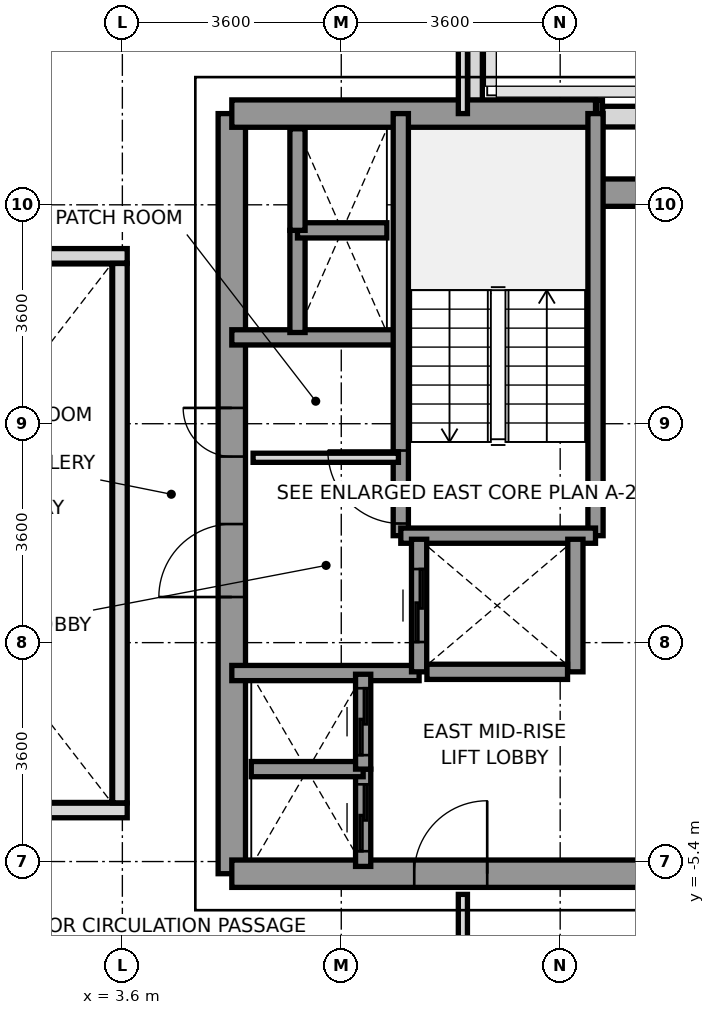
"""IFC4 building model, lengths in metres.
Left out: names, types, materials, properties, quantities, classifications, styles, units other than length and angle.
Written with IfcOpenShell. Run it as: python <this file> out.ifc"""

import sys

from ifc_helpers import new_model, si_unit, direction, frame, frame_2d, origin, place, context, subcontext, project, spatial, rectangle, extrude, source, transform, mapped, element, fill, save


model = new_model("IFC4")
c1 = context("Model", 3, precision=1e-05, world=origin(), true_north=direction((0.0, 1.0)))
c2 = subcontext(c1, "Body", "Model", "MODEL_VIEW")
j1 = project(units=[si_unit("LENGTHUNIT", "METRE"), si_unit("PLANEANGLEUNIT", "RADIAN")], contexts=[c1])
p1 = place(None, origin())
s1 = spatial("IfcSite", under=j1, at=p1, CompositionType="ELEMENT")
p2 = place(p1, origin())
s2 = spatial("IfcBuilding", under=s1, at=p2, CompositionType="ELEMENT")
p3 = place(p2, frame((0.0, 0.0, 148.2)))
s3 = spatial("IfcBuildingStorey", under=s2, at=p3, CompositionType="ELEMENT", Elevation=148.2)
p4 = place(p3, frame((11.498, 6.85, 0.0), z_axis=(0.0, 0.0, 1.0), x_axis=(1.0, 0.0, 0.0)))
e1 = element("IfcWall", 1, at=p4, inside=s3, PredefinedType="SOLIDWALL", context=c2, shape_type="SweptSolid", body=[
    extrude(rectangle(XDim=2.585, YDim=0.34, at=frame_2d((1.292, 0.0))), origin(), (0.0, 0.0, 1.0), 3.14),
])
p5 = place(p3, frame((9.4, 8.472, 0.0), z_axis=(0.0, 0.0, 1.0), x_axis=(0.0, -1.0, 0.0)))
e2 = element("IfcWall", 2, at=p5, inside=s3, PredefinedType="PARAPET", context=c2, shape_type="SweptSolid", body=[
    extrude(rectangle(XDim=1.519, YDim=0.24, at=frame_2d((0.76, 0.0))), origin(), (0.0, 0.0, 1.0), 1.15),
])
p6 = place(p3, frame((11.403, 7.0, 0.0), z_axis=(0.0, 0.0, 1.0), x_axis=(1.0, 0.0, 0.0)))
e3 = element("IfcWall", 3, at=p6, inside=s3, PredefinedType="PARAPET", context=c2, shape_type="SweptSolid", body=[
    extrude(rectangle(XDim=0.092, YDim=0.24, at=frame_2d((0.046, 0.0))), origin(), (0.0, 0.0, 1.0), 1.15),
])
p7 = place(p3, frame((5.4, -5.6, 0.0), z_axis=(0.0, 0.0, 1.0), x_axis=(0.0, 1.0, 0.0)))
e4 = element("IfcWall", 4, at=p7, inside=s3, PredefinedType="SHEAR", context=c2, shape_type="SweptSolid", body=[
    extrude(rectangle(XDim=12.5, YDim=0.45, at=frame_2d((6.25, 0.0))), origin(), (0.0, 0.0, 1.0), 3.14),
])
p8 = place(p7, frame((4.55, 0.0, 0.0)))
e5 = element("IfcOpeningElement", 5, at=p8, cuts=e4, PredefinedType="OPENING", context=c2, shape_type="SweptSolid", body=[
    extrude(rectangle(XDim=1.2, YDim=2.2, at=frame_2d((0.6, 1.1))), frame((0.0, 0.235, 0.0), z_axis=(0.0, -1.0, 0.0), x_axis=(1.0, 0.0, 0.0)), (0.0, 0.0, 1.0), 0.47),
])
p9 = place(p7, frame((6.86, 0.0, 0.0)))
e6 = element("IfcOpeningElement", 6, at=p9, cuts=e4, PredefinedType="OPENING", context=c2, shape_type="SweptSolid", body=[
    extrude(rectangle(XDim=0.8, YDim=2.1, at=frame_2d((0.4, 1.05))), frame((0.0, 0.235, 0.0), z_axis=(0.0, -1.0, 0.0), x_axis=(1.0, 0.0, 0.0)), (0.0, 0.0, 1.0), 0.47),
])
p10 = place(p3, frame((5.4, 6.9, 0.0), z_axis=(0.0, 0.0, 1.0), x_axis=(1.0, 0.0, 0.0)))
e7 = element("IfcWall", 7, at=p10, inside=s3, PredefinedType="SHEAR", context=c2, shape_type="SweptSolid", body=[
    extrude(rectangle(XDim=5.981, YDim=0.45, at=frame_2d((2.991, 0.0))), origin(), (0.0, 0.0, 1.0), 3.14),
])
p11 = place(p3, frame((11.381, 5.6, 0.0), z_axis=(0.0, 0.0, 1.0), x_axis=(1.0, 0.0, 0.0)))
e8 = element("IfcWall", 8, at=p11, inside=s3, PredefinedType="SHEAR", context=c2, shape_type="SweptSolid", body=[
    extrude(rectangle(XDim=1.819, YDim=0.45, at=frame_2d((0.909, 0.0))), origin(), (0.0, 0.0, 1.0), 3.14),
])
p12 = place(p3, frame((5.4, -5.6, 0.0), z_axis=(0.0, 0.0, 1.0), x_axis=(1.0, 0.0, 0.0)))
e9 = element("IfcWall", 9, at=p12, inside=s3, PredefinedType="SHEAR", context=c2, shape_type="SweptSolid", body=[
    extrude(rectangle(XDim=7.8, YDim=0.45, at=frame_2d((3.9, 0.0))), origin(), (0.0, 0.0, 1.0), 3.14),
])
p13 = place(p12, frame((3.0, 0.0, 0.0)))
e10 = element("IfcOpeningElement", 10, at=p13, cuts=e9, PredefinedType="OPENING", context=c2, shape_type="SweptSolid", body=[
    extrude(rectangle(XDim=1.2, YDim=2.2, at=frame_2d((0.6, 1.1))), frame((0.0, 0.235, 0.0), z_axis=(0.0, -1.0, 0.0), x_axis=(1.0, 0.0, 0.0)), (0.0, 0.0, 1.0), 0.47),
])
p14 = place(p3, frame((5.4, 3.22, 0.0), z_axis=(0.0, 0.0, 1.0), x_axis=(1.0, 0.0, 0.0)))
e11 = element("IfcWall", 11, at=p14, inside=s3, PredefinedType="SOLIDWALL", context=c2, shape_type="SweptSolid", body=[
    extrude(rectangle(XDim=2.78, YDim=0.25, at=frame_2d((1.39, 0.0))), origin(), (0.0, 0.0, 1.0), 3.14),
])
p15 = place(p3, frame((5.4, -2.3, 0.0), z_axis=(0.0, 0.0, 1.0), x_axis=(1.0, 0.0, 0.0)))
e12 = element("IfcWall", 12, at=p15, inside=s3, PredefinedType="SOLIDWALL", context=c2, shape_type="SweptSolid", body=[
    extrude(rectangle(XDim=3.08, YDim=0.25, at=frame_2d((1.54, 0.0))), origin(), (0.0, 0.0, 1.0), 3.14),
])
p16 = place(p3, frame((8.179, -0.041, 0.0), z_axis=(0.0, 0.0, 1.0), x_axis=(0.0, 1.0, 0.0)))
e13 = element("IfcWall", 13, at=p16, inside=s3, PredefinedType="SOLIDWALL", context=c2, shape_type="SweptSolid", body=[
    extrude(rectangle(XDim=6.941, YDim=0.25, at=frame_2d((3.47, 0.0))), origin(), (0.0, 0.0, 1.0), 3.14),
])
p17 = place(p16, frame((0.2, 0.0, 0.0)))
e14 = element("IfcOpeningElement", 14, at=p17, cuts=e13, PredefinedType="OPENING", context=c2, shape_type="SweptSolid", body=[
    extrude(rectangle(XDim=1.2, YDim=2.2, at=frame_2d((0.6, 1.1))), frame((0.0, 0.135, 0.0), z_axis=(0.0, -1.0, 0.0), x_axis=(1.0, 0.0, 0.0)), (0.0, 0.0, 1.0), 0.27),
])
p18 = place(p3, frame((11.381, -0.041, 0.0), z_axis=(0.0, 0.0, 1.0), x_axis=(0.0, 1.0, 0.0)))
e15 = element("IfcWall", 15, at=p18, inside=s3, PredefinedType="SOLIDWALL", context=c2, shape_type="SweptSolid", body=[
    extrude(rectangle(XDim=6.941, YDim=0.25, at=frame_2d((3.47, 0.0))), origin(), (0.0, 0.0, 1.0), 3.14),
])
p19 = place(p3, frame((8.179, -0.041, 0.0), z_axis=(0.0, 0.0, 1.0), x_axis=(1.0, 0.0, 0.0)))
e16 = element("IfcWall", 16, at=p19, inside=s3, PredefinedType="SOLIDWALL", context=c2, shape_type="SweptSolid", body=[
    extrude(rectangle(XDim=3.202, YDim=0.25, at=frame_2d((1.601, 0.0))), origin(), (0.0, 0.0, 1.0), 3.14),
])
p20 = place(p3, frame((8.48, -2.28, 0.0), z_axis=(0.0, 0.0, 1.0), x_axis=(0.0, 1.0, 0.0)))
e17 = element("IfcWall", 17, at=p20, inside=s3, PredefinedType="SOLIDWALL", context=c2, shape_type="SweptSolid", body=[
    extrude(rectangle(XDim=2.18, YDim=0.25, at=frame_2d((1.09, 0.0))), origin(), (0.0, 0.0, 1.0), 3.14),
])
p21 = place(p20, frame((0.49, 0.0, 0.0)))
e18 = element("IfcOpeningElement", 18, at=p21, cuts=e17, PredefinedType="OPENING", context=c2, shape_type="SweptSolid", body=[
    extrude(rectangle(XDim=1.2, YDim=2.2, at=frame_2d((0.6, 1.1))), frame((0.0, 0.135, 0.0), z_axis=(0.0, -1.0, 0.0), x_axis=(1.0, 0.0, 0.0)), (0.0, 0.0, 1.0), 0.27),
])
p22 = place(p3, frame((11.05, -2.28, 0.0), z_axis=(0.0, 0.0, 1.0), x_axis=(0.0, 1.0, 0.0)))
e19 = element("IfcWall", 19, at=p22, inside=s3, PredefinedType="SOLIDWALL", context=c2, shape_type="SweptSolid", body=[
    extrude(rectangle(XDim=2.18, YDim=0.25, at=frame_2d((1.09, 0.0))), origin(), (0.0, 0.0, 1.0), 3.14),
])
p23 = place(p3, frame((8.609, -2.28, 0.0), z_axis=(0.0, 0.0, 1.0), x_axis=(1.0, 0.0, 0.0)))
e20 = element("IfcWall", 20, at=p23, inside=s3, PredefinedType="SOLIDWALL", context=c2, shape_type="SweptSolid", body=[
    extrude(rectangle(XDim=2.312, YDim=0.25, at=frame_2d((1.156, 0.0))), origin(), (0.0, 0.0, 1.0), 3.14),
])
p24 = place(p3, frame((7.56, -5.48, 0.0), z_axis=(0.0, 0.0, 1.0), x_axis=(0.0, 1.0, 0.0)))
e21 = element("IfcWall", 21, at=p24, inside=s3, PredefinedType="SOLIDWALL", context=c2, shape_type="SweptSolid", body=[
    extrude(rectangle(XDim=1.6, YDim=0.25, at=frame_2d((0.8, 0.0))), origin(), (0.0, 0.0, 1.0), 3.14),
])
p25 = place(p24, frame((0.25, 0.0, 0.0)))
e22 = element("IfcOpeningElement", 22, at=p25, cuts=e21, PredefinedType="OPENING", context=c2, shape_type="SweptSolid", body=[
    extrude(rectangle(XDim=1.1, YDim=2.2, at=frame_2d((0.55, 1.1))), frame((0.0, 0.135, 0.0), z_axis=(0.0, -1.0, 0.0), x_axis=(1.0, 0.0, 0.0)), (0.0, 0.0, 1.0), 0.27),
])
p26 = place(p3, frame((5.72, -3.88, 0.0), z_axis=(0.0, 0.0, 1.0), x_axis=(1.0, 0.0, 0.0)))
e23 = element("IfcWall", 23, at=p26, inside=s3, PredefinedType="SOLIDWALL", context=c2, shape_type="SweptSolid", body=[
    extrude(rectangle(XDim=1.84, YDim=0.25, at=frame_2d((0.92, 0.0))), origin(), (0.0, 0.0, 1.0), 3.14),
])
p27 = place(p3, frame((7.56, -3.88, 0.0), z_axis=(0.0, 0.0, 1.0), x_axis=(0.0, 1.0, 0.0)))
e24 = element("IfcWall", 24, at=p27, inside=s3, PredefinedType="SOLIDWALL", context=c2, shape_type="SweptSolid", body=[
    extrude(rectangle(XDim=1.56, YDim=0.25, at=frame_2d((0.78, 0.0))), origin(), (0.0, 0.0, 1.0), 3.14),
])
p28 = place(p27, frame((0.23, 0.0, 0.0)))
e25 = element("IfcOpeningElement", 25, at=p28, cuts=e24, PredefinedType="OPENING", context=c2, shape_type="SweptSolid", body=[
    extrude(rectangle(XDim=1.1, YDim=2.2, at=frame_2d((0.55, 1.1))), frame((0.0, 0.135, 0.0), z_axis=(0.0, -1.0, 0.0), x_axis=(1.0, 0.0, 0.0)), (0.0, 0.0, 1.0), 0.27),
])
p29 = place(p3, frame((6.48, 3.3, 0.0), z_axis=(0.0, 0.0, 1.0), x_axis=(0.0, 1.0, 0.0)))
e26 = element("IfcWall", 26, at=p29, inside=s3, PredefinedType="SOLIDWALL", context=c2, shape_type="SweptSolid", body=[
    extrude(rectangle(XDim=1.68, YDim=0.25, at=frame_2d((0.84, 0.0))), origin(), (0.0, 0.0, 1.0), 3.14),
])
p30 = place(p3, frame((6.48, 4.98, 0.0), z_axis=(0.0, 0.0, 1.0), x_axis=(1.0, 0.0, 0.0)))
e27 = element("IfcWall", 27, at=p30, inside=s3, PredefinedType="SOLIDWALL", context=c2, shape_type="SweptSolid", body=[
    extrude(rectangle(XDim=1.47, YDim=0.25, at=frame_2d((0.735, 0.0))), origin(), (0.0, 0.0, 1.0), 3.14),
])
p31 = place(p3, frame((6.48, 4.98, 0.0), z_axis=(0.0, 0.0, 1.0), x_axis=(0.0, 1.0, 0.0)))
e28 = element("IfcWall", 28, at=p31, inside=s3, PredefinedType="SOLIDWALL", context=c2, shape_type="SweptSolid", body=[
    extrude(rectangle(XDim=1.67, YDim=0.25, at=frame_2d((0.835, 0.0))), origin(), (0.0, 0.0, 1.0), 3.14),
])
p32 = place(p3, frame((5.75, 1.24, 0.0), z_axis=(0.0, 0.0, 1.0), x_axis=(1.0, 0.0, 0.0)))
e29 = element("IfcWall", 29, at=p32, inside=s3, PredefinedType="PARTITIONING", context=c2, shape_type="SweptSolid", body=[
    extrude(rectangle(XDim=2.39, YDim=0.15, at=frame_2d((1.195, 0.0))), origin(), (0.0, 0.0, 1.0), 2.24),
])
p33 = place(p3, frame((9.2, 6.9, 0.0), z_axis=(0.0, 0.0, 1.0), x_axis=(0.0, 1.0, 0.0)))
e30 = element("IfcWall", 30, at=p33, inside=s3, PredefinedType="PARTITIONING", context=c2, shape_type="SweptSolid", body=[
    extrude(rectangle(XDim=8.78, YDim=0.15, at=frame_2d((4.39, 0.0))), origin(), (0.0, 0.0, 1.0), 2.64),
])
p34 = place(p3, frame((9.2, -15.68, 0.0), z_axis=(0.0, 0.0, 1.0), x_axis=(0.0, 1.0, 0.0)))
e31 = element("IfcWall", 31, at=p34, inside=s3, PredefinedType="PARTITIONING", context=c2, shape_type="SweptSolid", body=[
    extrude(rectangle(XDim=9.74, YDim=0.15, at=frame_2d((4.87, 0.0))), origin(), (0.0, 0.0, 1.0), 2.64),
])
for number, where, z_axis, x_axis in (
    (32, (-3.68, -4.56, 0.0), (0.0, 0.0, 1.0), (1.0, 0.0, 0.0)),
    (33, (-3.68, 4.56, 0.0), (0.0, 0.0, 1.0), (1.0, 0.0, 0.0)),
):
    element("IfcWall", number, at=place(p3, frame(where, z_axis=z_axis, x_axis=x_axis)), inside=s3, PredefinedType="PARAPET", context=c2, shape_type="SweptSolid", body=[
        extrude(rectangle(XDim=7.36, YDim=0.24, at=frame_2d((3.68, 0.0))), origin(), (0.0, 0.0, 1.0), 1.15),
    ])
p35 = place(p3, frame((3.56, -4.435, 0.0), z_axis=(0.0, 0.0, 1.0), x_axis=(0.0, 1.0, 0.0)))
e34 = element("IfcWall", 34, at=p35, inside=s3, PredefinedType="PARAPET", context=c2, shape_type="SweptSolid", body=[
    extrude(rectangle(XDim=8.87, YDim=0.24, at=frame_2d((4.435, 0.0))), origin(), (0.0, 0.0, 1.0), 1.15),
])
m1 = source(origin(), c2, "Body", "SweptSolid", [
    extrude(rectangle(XDim=1.2, YDim=2.2, at=frame_2d((0.6, 1.1))), frame((0.0, 0.025, 0.0), z_axis=(0.0, -1.0, 0.0), x_axis=(1.0, 0.0, 0.0)), (0.0, 0.0, 1.0), 0.05),
])
p36 = place(p17, origin())
e35 = element("IfcDoor", 35, at=p36, inside=s3, OperationType="SINGLE_SWING_RIGHT", PredefinedType="DOOR", context=c2, shape_type="MappedRepresentation", body=[
    mapped(m1, transform((0.0, 0.0, 0.0), x_axis=(1.0, 0.0, 0.0), y_axis=(0.0, 1.0, 0.0), z_axis=(0.0, 0.0, 1.0), scale=1.0)),
])
fill(e14, e35)
p37 = place(p8, origin())
e36 = element("IfcDoor", 36, at=p37, inside=s3, OperationType="SINGLE_SWING_LEFT", PredefinedType="DOOR", context=c2, shape_type="MappedRepresentation", body=[
    mapped(m1, transform((0.0, 0.0, 0.0), x_axis=(1.0, 0.0, 0.0), y_axis=(0.0, 1.0, 0.0), z_axis=(0.0, 0.0, 1.0), scale=1.0)),
])
fill(e5, e36)
p38 = place(p13, origin())
e37 = element("IfcDoor", 37, at=p38, inside=s3, OperationType="SINGLE_SWING_RIGHT", PredefinedType="DOOR", context=c2, shape_type="MappedRepresentation", body=[
    mapped(m1, transform((0.0, 0.0, 0.0), x_axis=(1.0, 0.0, 0.0), y_axis=(0.0, 1.0, 0.0), z_axis=(0.0, 0.0, 1.0), scale=1.0)),
])
fill(e10, e37)
m2 = source(origin(), c2, "Body", "SweptSolid", [
    extrude(rectangle(XDim=0.8, YDim=2.1, at=frame_2d((0.4, 1.05))), frame((0.0, 0.025, 0.0), z_axis=(0.0, -1.0, 0.0), x_axis=(1.0, 0.0, 0.0)), (0.0, 0.0, 1.0), 0.05),
])
p39 = place(p9, origin())
e38 = element("IfcDoor", 38, at=p39, inside=s3, OperationType="SINGLE_SWING_RIGHT", PredefinedType="DOOR", context=c2, shape_type="MappedRepresentation", body=[
    mapped(m2, transform((0.0, 0.0, 0.0), x_axis=(1.0, 0.0, 0.0), y_axis=(0.0, 1.0, 0.0), z_axis=(0.0, 0.0, 1.0), scale=1.0)),
])
fill(e6, e38)
p40 = place(p21, origin())
e39 = element("IfcDoor", 39, at=p40, inside=s3, OperationType="SLIDING_TO_RIGHT", PredefinedType="DOOR", context=c2, shape_type="MappedRepresentation", body=[
    mapped(m1, transform((0.0, 0.0, 0.0), x_axis=(1.0, 0.0, 0.0), y_axis=(0.0, 1.0, 0.0), z_axis=(0.0, 0.0, 1.0), scale=1.0)),
])
fill(e18, e39)
m3 = source(origin(), c2, "Body", "SweptSolid", [
    extrude(rectangle(XDim=1.1, YDim=2.2, at=frame_2d((0.55, 1.1))), frame((0.0, 0.025, 0.0), z_axis=(0.0, -1.0, 0.0), x_axis=(1.0, 0.0, 0.0)), (0.0, 0.0, 1.0), 0.05),
])
p41 = place(p25, origin())
e40 = element("IfcDoor", 40, at=p41, inside=s3, OperationType="SLIDING_TO_LEFT", PredefinedType="DOOR", context=c2, shape_type="MappedRepresentation", body=[
    mapped(m3, transform((0.0, 0.0, 0.0), x_axis=(1.0, 0.0, 0.0), y_axis=(0.0, 1.0, 0.0), z_axis=(0.0, 0.0, 1.0), scale=1.0)),
])
fill(e22, e40)
p42 = place(p28, origin())
e41 = element("IfcDoor", 41, at=p42, inside=s3, OperationType="SLIDING_TO_LEFT", PredefinedType="DOOR", context=c2, shape_type="MappedRepresentation", body=[
    mapped(m3, transform((0.0, 0.0, 0.0), x_axis=(1.0, 0.0, 0.0), y_axis=(0.0, 1.0, 0.0), z_axis=(0.0, 0.0, 1.0), scale=1.0)),
])
fill(e25, e41)
save(model, sys.argv[1])
